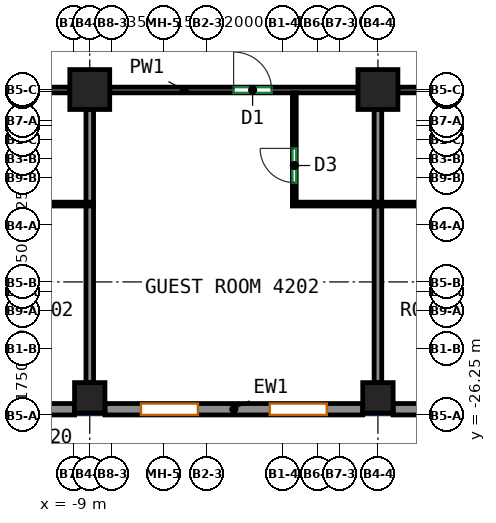
"""IFC4 building model, lengths in metres.
Left out: names, types, materials, properties, quantities, classifications, styles, units other than length and angle.
Written with IfcOpenShell. Run it as: python <this file> out.ifc"""

import sys

from ifc_helpers import new_model, si_unit, direction, frame, frame_2d, origin, origin_2d, place, context, subcontext, project, spatial, rectangle, extrude, source, transform, mapped, element, fill, save


model = new_model("IFC4")
c1 = context("Model", 3, precision=1e-05, world=origin(), true_north=direction((0.0, 1.0)))
c2 = subcontext(c1, "Body", "Model", "MODEL_VIEW")
j1 = project(units=[si_unit("LENGTHUNIT", "METRE"), si_unit("PLANEANGLEUNIT", "RADIAN")], contexts=[c1])
p1 = place(None, origin())
s1 = spatial("IfcSite", under=j1, at=p1, CompositionType="ELEMENT")
p2 = place(p1, origin())
s2 = spatial("IfcBuilding", under=s1, at=p2, CompositionType="ELEMENT")
p3 = place(p2, frame((0.0, 0.0, 178.7)))
s3 = spatial("IfcBuildingStorey", under=s2, at=p3, CompositionType="ELEMENT", Elevation=178.7)
m1 = source(origin(), c2, "Body", "SweptSolid", [
    extrude(rectangle(XDim=0.8, YDim=0.8, at=origin_2d()), origin(), (0.0, 0.0, 1.0), 3.12),
])
p4 = place(p3, frame((-8.583, -25.8, 0.0), z_axis=(0.0, 0.0, 1.0), x_axis=(1.0, 0.0, 0.0)))
e1 = element("IfcColumn", 1, at=p4, inside=s3, PredefinedType="COLUMN", context=c2, shape_type="MappedRepresentation", body=[
    mapped(m1, transform((0.0, 0.0, 0.0))),
])
m2 = source(origin(), c2, "Body", "SweptSolid", [
    extrude(rectangle(XDim=1.05, YDim=1.05, at=origin_2d()), origin(), (0.0, 0.0, 1.0), 3.12),
])
p5 = place(p3, frame((-8.583, -17.688, 0.0), z_axis=(0.0, 0.0, 1.0), x_axis=(1.0, 0.0, 0.0)))
e2 = element("IfcColumn", 2, at=p5, inside=s3, PredefinedType="COLUMN", context=c2, shape_type="MappedRepresentation", body=[
    mapped(m2, transform((0.0, 0.0, 0.0))),
])
p6 = place(p3, frame((-1.0, -25.8, 0.0), z_axis=(0.0, 0.0, 1.0), x_axis=(1.0, 0.0, 0.0)))
e3 = element("IfcColumn", 3, at=p6, inside=s3, PredefinedType="COLUMN", context=c2, shape_type="MappedRepresentation", body=[
    mapped(m1, transform((0.0, 0.0, 0.0))),
])
p7 = place(p3, frame((-1.0, -17.688, 0.0), z_axis=(0.0, 0.0, 1.0), x_axis=(1.0, 0.0, 0.0)))
e4 = element("IfcColumn", 4, at=p7, inside=s3, PredefinedType="COLUMN", context=c2, shape_type="MappedRepresentation", body=[
    mapped(m2, transform((0.0, 0.0, 0.0))),
])
m3 = source(origin(), c2, "Body", "SweptSolid", [
    extrude(rectangle(XDim=6.783, YDim=0.3, at=frame_2d((3.392, 0.0))), origin(), (0.0, 0.0, 1.0), 3.12),
])
p8 = place(p3, frame((-15.767, -26.1, 0.0), z_axis=(0.0, 0.0, 1.0), x_axis=(1.0, 0.0, 0.0)))
e5 = element("IfcWall", 5, at=p8, inside=s3, PredefinedType="SOLIDWALL", context=c2, shape_type="MappedRepresentation", body=[
    mapped(m3, transform((0.0, 0.0, 0.0))),
])
p9 = place(p8, frame((0.946, 0.0, 0.85)))
e6 = element("IfcOpeningElement", 6, at=p9, cuts=e5, PredefinedType="OPENING", context=c2, shape_type="SweptSolid", body=[
    extrude(rectangle(XDim=1.5, YDim=1.95, at=frame_2d((0.75, 0.975))), frame((0.0, 0.16, 0.0), z_axis=(0.0, -1.0, 0.0), x_axis=(1.0, 0.0, 0.0)), (0.0, 0.0, 1.0), 0.32),
])
p10 = place(p8, frame((4.338, 0.0, 0.85)))
e7 = element("IfcOpeningElement", 7, at=p10, cuts=e5, PredefinedType="OPENING", context=c2, shape_type="SweptSolid", body=[
    extrude(rectangle(XDim=1.5, YDim=1.95, at=frame_2d((0.75, 0.975))), frame((0.0, 0.16, 0.0), z_axis=(0.0, -1.0, 0.0), x_axis=(1.0, 0.0, 0.0)), (0.0, 0.0, 1.0), 0.32),
])
m4 = source(origin(), c2, "Body", "SweptSolid", [
    extrude(rectangle(XDim=6.783, YDim=0.3, at=frame_2d((3.392, 0.0))), origin(), (0.0, 0.0, 1.0), 3.12),
])
p11 = place(p3, frame((-8.183, -26.1, 0.0), z_axis=(0.0, 0.0, 1.0), x_axis=(1.0, 0.0, 0.0)))
e8 = element("IfcWall", 8, at=p11, inside=s3, PredefinedType="SOLIDWALL", context=c2, shape_type="MappedRepresentation", body=[
    mapped(m4, transform((0.0, 0.0, 0.0))),
])
p12 = place(p11, frame((0.946, 0.0, 0.85)))
e9 = element("IfcOpeningElement", 9, at=p12, cuts=e8, PredefinedType="OPENING", context=c2, shape_type="SweptSolid", body=[
    extrude(rectangle(XDim=1.5, YDim=1.95, at=frame_2d((0.75, 0.975))), frame((0.0, 0.16, 0.0), z_axis=(0.0, -1.0, 0.0), x_axis=(1.0, 0.0, 0.0)), (0.0, 0.0, 1.0), 0.32),
])
p13 = place(p11, frame((4.337, 0.0, 0.85)))
e10 = element("IfcOpeningElement", 10, at=p13, cuts=e8, PredefinedType="OPENING", context=c2, shape_type="SweptSolid", body=[
    extrude(rectangle(XDim=1.5, YDim=1.95, at=frame_2d((0.75, 0.975))), frame((0.0, 0.16, 0.0), z_axis=(0.0, -1.0, 0.0), x_axis=(1.0, 0.0, 0.0)), (0.0, 0.0, 1.0), 0.32),
])
p14 = place(p3, frame((-0.6, -26.1, 0.0), z_axis=(0.0, 0.0, 1.0), x_axis=(1.0, 0.0, 0.0)))
e11 = element("IfcWall", 11, at=p14, inside=s3, PredefinedType="SOLIDWALL", context=c2, shape_type="MappedRepresentation", body=[
    mapped(m4, transform((0.0, 0.0, 0.0))),
])
p15 = place(p14, frame((0.946, 0.0, 0.85)))
e12 = element("IfcOpeningElement", 12, at=p15, cuts=e11, PredefinedType="OPENING", context=c2, shape_type="SweptSolid", body=[
    extrude(rectangle(XDim=1.5, YDim=1.95, at=frame_2d((0.75, 0.975))), frame((0.0, 0.16, 0.0), z_axis=(0.0, -1.0, 0.0), x_axis=(1.0, 0.0, 0.0)), (0.0, 0.0, 1.0), 0.32),
])
p16 = place(p14, frame((4.337, 0.0, 0.85)))
e13 = element("IfcOpeningElement", 13, at=p16, cuts=e11, PredefinedType="OPENING", context=c2, shape_type="SweptSolid", body=[
    extrude(rectangle(XDim=1.5, YDim=1.95, at=frame_2d((0.75, 0.975))), frame((0.0, 0.16, 0.0), z_axis=(0.0, -1.0, 0.0), x_axis=(1.0, 0.0, 0.0)), (0.0, 0.0, 1.0), 0.32),
])
p17 = place(p3, frame((-15.642, -17.7, 0.0), z_axis=(0.0, 0.0, 1.0), x_axis=(1.0, 0.0, 0.0)))
e14 = element("IfcWall", 14, at=p17, inside=s3, PredefinedType="PARTITIONING", context=c2, shape_type="SweptSolid", body=[
    extrude(rectangle(XDim=6.534, YDim=0.15, at=frame_2d((3.267, 0.0))), origin(), (0.0, 0.0, 1.0), 3.12),
])
p18 = place(p17, frame((3.563, 0.0, 0.0)))
e15 = element("IfcOpeningElement", 15, at=p18, cuts=e14, PredefinedType="OPENING", context=c2, shape_type="SweptSolid", body=[
    extrude(rectangle(XDim=1.0, YDim=2.1, at=frame_2d((0.5, 1.05))), frame((0.0, 0.085, 0.0), z_axis=(0.0, -1.0, 0.0), x_axis=(1.0, 0.0, 0.0)), (0.0, 0.0, 1.0), 0.17),
])
p19 = place(p3, frame((-8.058, -17.7, 0.0), z_axis=(0.0, 0.0, 1.0), x_axis=(1.0, 0.0, 0.0)))
e16 = element("IfcWall", 16, at=p19, inside=s3, PredefinedType="PARTITIONING", context=c2, shape_type="SweptSolid", body=[
    extrude(rectangle(XDim=6.533, YDim=0.15, at=frame_2d((3.267, 0.0))), origin(), (0.0, 0.0, 1.0), 3.12),
])
p20 = place(p19, frame((3.26, 0.0, 0.0)))
e17 = element("IfcOpeningElement", 17, at=p20, cuts=e16, PredefinedType="OPENING", context=c2, shape_type="SweptSolid", body=[
    extrude(rectangle(XDim=1.0, YDim=2.1, at=frame_2d((0.5, 1.05))), frame((0.0, 0.085, 0.0), z_axis=(0.0, -1.0, 0.0), x_axis=(1.0, 0.0, 0.0)), (0.0, 0.0, 1.0), 0.17),
])
p21 = place(p3, frame((-0.475, -17.7, 0.0), z_axis=(0.0, 0.0, 1.0), x_axis=(1.0, 0.0, 0.0)))
e18 = element("IfcWall", 18, at=p21, inside=s3, PredefinedType="PARTITIONING", context=c2, shape_type="SweptSolid", body=[
    extrude(rectangle(XDim=6.533, YDim=0.15, at=frame_2d((3.267, 0.0))), origin(), (0.0, 0.0, 1.0), 3.12),
])
p22 = place(p21, frame((1.926, 0.0, 0.0)))
e19 = element("IfcOpeningElement", 19, at=p22, cuts=e18, PredefinedType="OPENING", context=c2, shape_type="SweptSolid", body=[
    extrude(rectangle(XDim=1.0, YDim=2.1, at=frame_2d((0.5, 1.05))), frame((0.0, 0.085, 0.0), z_axis=(0.0, -1.0, 0.0), x_axis=(1.0, 0.0, 0.0)), (0.0, 0.0, 1.0), 0.17),
])
p23 = place(p21, frame((3.387, 0.0, 0.0)))
e20 = element("IfcOpeningElement", 20, at=p23, cuts=e18, PredefinedType="OPENING", context=c2, shape_type="SweptSolid", body=[
    extrude(rectangle(XDim=1.0, YDim=2.1, at=frame_2d((0.5, 1.05))), frame((0.0, 0.085, 0.0), z_axis=(0.0, -1.0, 0.0), x_axis=(1.0, 0.0, 0.0)), (0.0, 0.0, 1.0), 0.17),
])
p24 = place(p3, frame((-10.833, -20.702, 0.0), z_axis=(0.0, 0.0, 1.0), x_axis=(1.0, 0.0, 0.0)))
e21 = element("IfcWall", 21, at=p24, inside=s3, PredefinedType="PARTITIONING", context=c2, shape_type="SweptSolid", body=[
    extrude(rectangle(XDim=2.35, YDim=0.1, at=frame_2d((1.175, 0.0))), origin(), (0.0, 0.0, 1.0), 3.12),
])
p25 = place(p3, frame((-8.583, -25.4, 0.0), z_axis=(0.0, 0.0, 1.0), x_axis=(0.0, 1.0, 0.0)))
e22 = element("IfcWall", 22, at=p25, inside=s3, PredefinedType="PARTITIONING", context=c2, shape_type="SweptSolid", body=[
    extrude(rectangle(XDim=4.648, YDim=0.2, at=frame_2d((2.324, 0.0))), origin(), (0.0, 0.0, 1.0), 3.12),
])
p26 = place(p3, frame((-8.583, -20.652, 0.0), z_axis=(0.0, 0.0, 1.0), x_axis=(0.0, 1.0, 0.0)))
e23 = element("IfcWall", 23, at=p26, inside=s3, PredefinedType="PARTITIONING", context=c2, shape_type="SweptSolid", body=[
    extrude(rectangle(XDim=2.44, YDim=0.2, at=frame_2d((1.22, 0.0))), origin(), (0.0, 0.0, 1.0), 3.12),
])
p27 = place(p3, frame((-3.2, -20.652, 0.0), z_axis=(0.0, 0.0, 1.0), x_axis=(0.0, 1.0, 0.0)))
e24 = element("IfcWall", 24, at=p27, inside=s3, PredefinedType="PARTITIONING", context=c2, shape_type="SweptSolid", body=[
    extrude(rectangle(XDim=2.875, YDim=0.1, at=frame_2d((1.438, 0.0))), origin(), (0.0, 0.0, 1.0), 3.12),
])
p28 = place(p27, frame((0.515, 0.0, 0.0)))
e25 = element("IfcOpeningElement", 25, at=p28, cuts=e24, PredefinedType="OPENING", context=c2, shape_type="SweptSolid", body=[
    extrude(rectangle(XDim=0.9, YDim=2.1, at=frame_2d((0.45, 1.05))), frame((0.0, 0.06, 0.0), z_axis=(0.0, -1.0, 0.0), x_axis=(1.0, 0.0, 0.0)), (0.0, 0.0, 1.0), 0.12),
])
p29 = place(p3, frame((-3.25, -20.702, 0.0), z_axis=(0.0, 0.0, 1.0), x_axis=(1.0, 0.0, 0.0)))
e26 = element("IfcWall", 26, at=p29, inside=s3, PredefinedType="PARTITIONING", context=c2, shape_type="SweptSolid", body=[
    extrude(rectangle(XDim=4.5, YDim=0.1, at=frame_2d((2.25, 0.0))), origin(), (0.0, 0.0, 1.0), 3.12),
])
p30 = place(p3, frame((-1.0, -25.4, 0.0), z_axis=(0.0, 0.0, 1.0), x_axis=(0.0, 1.0, 0.0)))
e27 = element("IfcWall", 27, at=p30, inside=s3, PredefinedType="PARTITIONING", context=c2, shape_type="SweptSolid", body=[
    extrude(rectangle(XDim=4.648, YDim=0.2, at=frame_2d((2.324, 0.0))), origin(), (0.0, 0.0, 1.0), 3.12),
])
p31 = place(p3, frame((-1.0, -20.652, 0.0), z_axis=(0.0, 0.0, 1.0), x_axis=(0.0, 1.0, 0.0)))
e28 = element("IfcWall", 28, at=p31, inside=s3, PredefinedType="PARTITIONING", context=c2, shape_type="SweptSolid", body=[
    extrude(rectangle(XDim=2.44, YDim=0.2, at=frame_2d((1.22, 0.0))), origin(), (0.0, 0.0, 1.0), 3.12),
])
p32 = place(p12, origin())
e29 = element("IfcWindow", 29, at=p32, inside=s3, PartitioningType="SINGLE_PANEL", PredefinedType="WINDOW", context=c2, shape_type="SweptSolid", body=[
    extrude(rectangle(XDim=1.5, YDim=1.95, at=frame_2d((0.75, 0.975))), frame((0.0, 0.03, 0.0), z_axis=(0.0, -1.0, 0.0), x_axis=(1.0, 0.0, 0.0)), (0.0, 0.0, 1.0), 0.06),
])
fill(e9, e29)
p33 = place(p13, origin())
e30 = element("IfcWindow", 30, at=p33, inside=s3, PartitioningType="SINGLE_PANEL", PredefinedType="WINDOW", context=c2, shape_type="SweptSolid", body=[
    extrude(rectangle(XDim=1.5, YDim=1.95, at=frame_2d((0.75, 0.975))), frame((0.0, 0.03, 0.0), z_axis=(0.0, -1.0, 0.0), x_axis=(1.0, 0.0, 0.0)), (0.0, 0.0, 1.0), 0.06),
])
fill(e10, e30)
p34 = place(p28, origin())
e31 = element("IfcDoor", 31, at=p34, inside=s3, OperationType="SINGLE_SWING_RIGHT", PredefinedType="DOOR", context=c2, shape_type="SweptSolid", body=[
    extrude(rectangle(XDim=0.9, YDim=2.1, at=frame_2d((0.45, 1.05))), frame((0.0, 0.025, 0.0), z_axis=(0.0, -1.0, 0.0), x_axis=(1.0, 0.0, 0.0)), (0.0, 0.0, 1.0), 0.05),
])
fill(e25, e31)
p35 = place(p20, origin())
e32 = element("IfcDoor", 32, at=p35, inside=s3, OperationType="SINGLE_SWING_LEFT", PredefinedType="DOOR", context=c2, shape_type="SweptSolid", body=[
    extrude(rectangle(XDim=1.0, YDim=2.1, at=frame_2d((0.5, 1.05))), frame((0.0, 0.025, 0.0), z_axis=(0.0, -1.0, 0.0), x_axis=(1.0, 0.0, 0.0)), (0.0, 0.0, 1.0), 0.05),
])
fill(e17, e32)
save(model, sys.argv[1])
